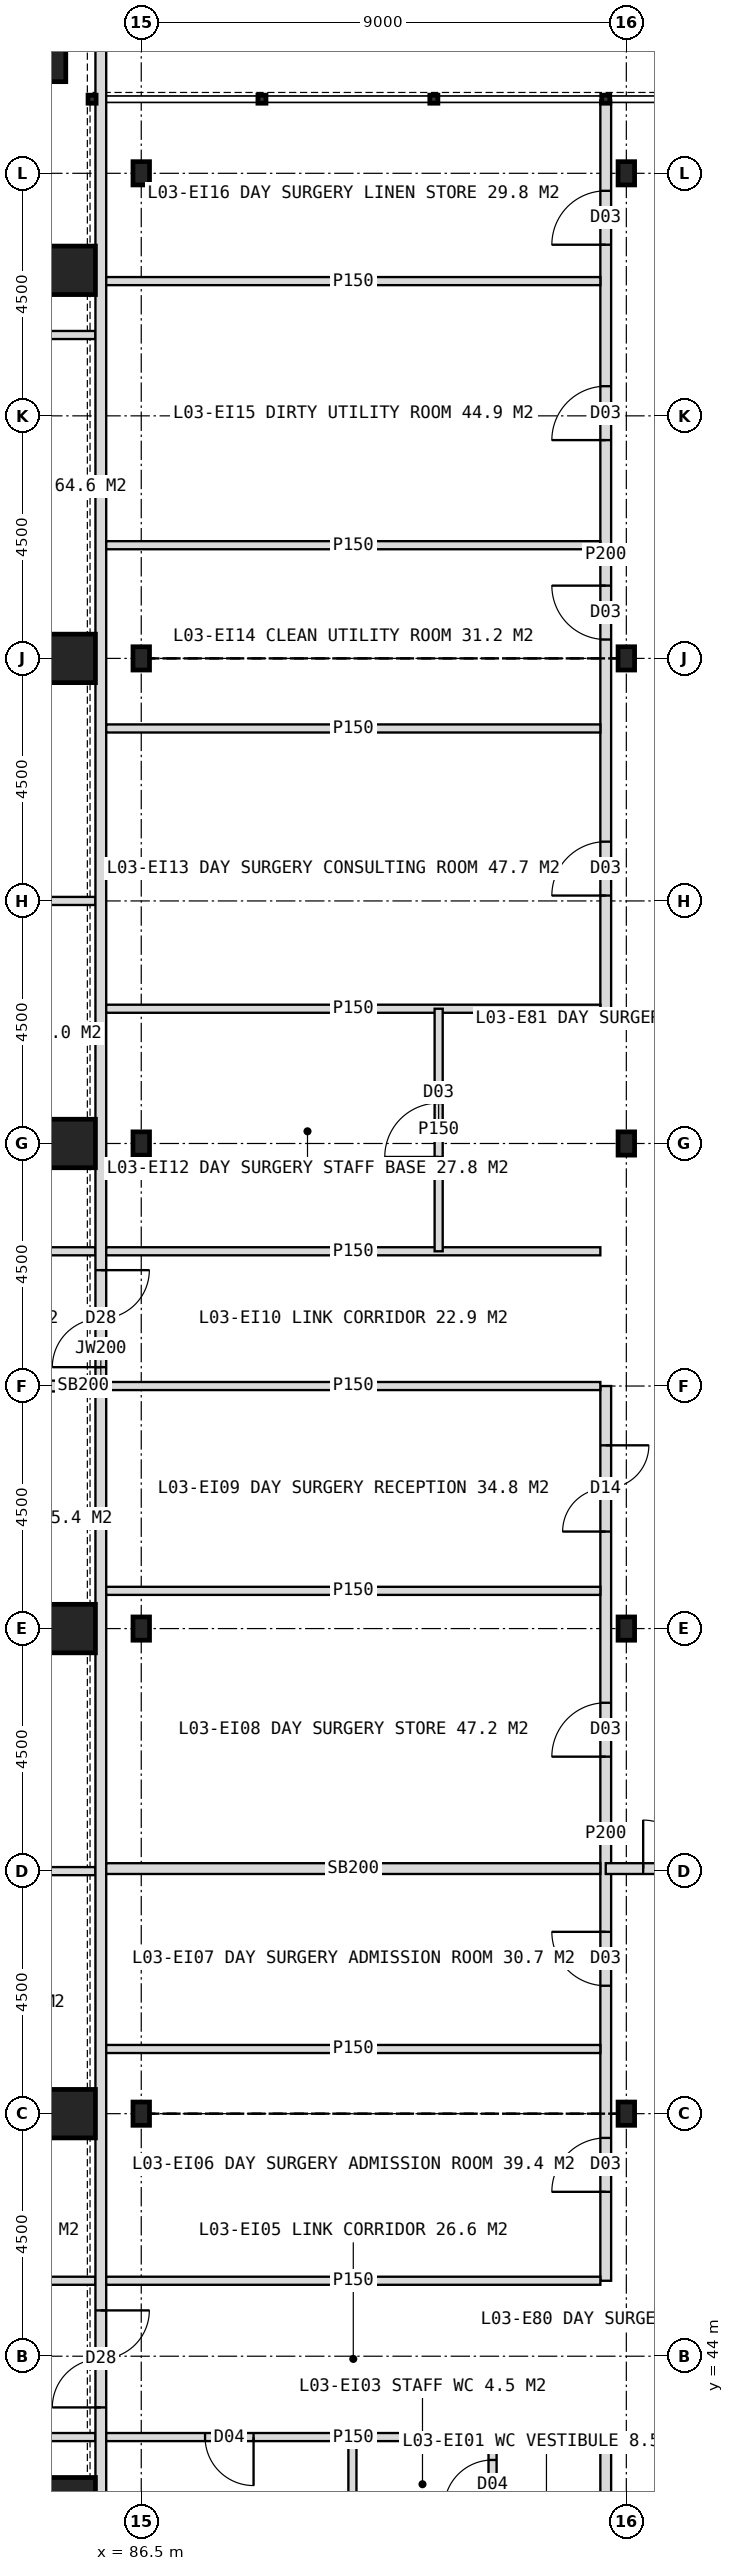
"""IFC4 building model, lengths in metres.
Left out: names, types, materials, properties, quantities, classifications, styles, units other than length and angle.
Written with IfcOpenShell. Run it as: python <this file> out.ifc"""

import sys

from ifc_helpers import new_model, si_unit, direction, frame, frame_2d, origin, origin_2d, place, context, subcontext, project, spatial, rectangle, hollow_rectangle, i_section, extrude, element, fill, save


model = new_model("IFC4")
c1 = context("Model", 3, precision=1e-05, world=origin(), true_north=direction((0.0, 1.0)))
c2 = subcontext(c1, "Body", "Model", "MODEL_VIEW")
j1 = project(units=[si_unit("LENGTHUNIT", "METRE"), si_unit("PLANEANGLEUNIT", "RADIAN")], contexts=[c1])
p1 = place(None, origin())
s1 = spatial("IfcSite", under=j1, at=p1, CompositionType="ELEMENT")
p2 = place(p1, origin())
s2 = spatial("IfcBuilding", under=s1, at=p2, CompositionType="ELEMENT")
p3 = place(p2, frame((0.0, 0.0, 16.5)))
s3 = spatial("IfcBuildingStorey", under=s2, at=p3, CompositionType="ELEMENT", Elevation=16.5)
for number, where, z_axis, x_axis in (
    (1, (85.2, 41.3, 0.0), (0.0, 0.0, 1.0), (1.0, 0.0, 0.0)),
    (2, (85.2, 48.5, 0.0), (0.0, 0.0, 1.0), (1.0, 0.0, 0.0)),
    (3, (85.2, 57.5, 0.0), (0.0, 0.0, 1.0), (1.0, 0.0, 0.0)),
    (4, (85.2, 66.5, 0.0), (0.0, 0.0, 1.0), (1.0, 0.0, 0.0)),
    (5, (85.2, 75.5, 0.0), (0.0, 0.0, 1.0), (1.0, 0.0, 0.0)),
    (6, (85.2, 82.7, 0.0), (0.0, 0.0, 1.0), (1.0, 0.0, 0.0)),
    (7, (84.65, 86.65, 0.0), (0.0, 0.0, 1.0), (1.0, 0.0, 0.0)),
):
    element("IfcColumn", number, at=place(p3, frame(where, z_axis=z_axis, x_axis=x_axis)), inside=s3, PredefinedType="COLUMN", context=c2, shape_type="SweptSolid", body=[
        extrude(hollow_rectangle(XDim=0.9, YDim=0.9, WallThickness=0.08, at=origin_2d()), origin(), (0.0, 0.0, 1.0), 4.5),
    ])
for number, where, z_axis, x_axis in (
    (8, (86.5, 48.5, 0.0), (0.0, 0.0, 1.0), (1.0, 0.0, 0.0)),
    (9, (86.5, 57.5, 0.0), (0.0, 0.0, 1.0), (1.0, 0.0, 0.0)),
    (10, (86.5, 66.5, 0.0), (0.0, 0.0, 1.0), (1.0, 0.0, 0.0)),
    (11, (86.5, 75.5, 0.0), (0.0, 0.0, 1.0), (1.0, 0.0, 0.0)),
    (12, (86.5, 84.5, 0.0), (0.0, 0.0, 1.0), (1.0, 0.0, 0.0)),
    (13, (95.5, 48.5, 0.0), (0.0, 0.0, 1.0), (1.0, 0.0, 0.0)),
    (14, (95.5, 57.5, 0.0), (0.0, 0.0, 1.0), (1.0, 0.0, 0.0)),
    (15, (95.5, 66.5, 0.0), (0.0, 0.0, 1.0), (1.0, 0.0, 0.0)),
    (16, (95.5, 75.5, 0.0), (0.0, 0.0, 1.0), (1.0, 0.0, 0.0)),
    (17, (95.5, 84.5, 0.0), (0.0, 0.0, 1.0), (1.0, 0.0, 0.0)),
):
    element("IfcColumn", number, at=place(p3, frame(where, z_axis=z_axis, x_axis=x_axis)), inside=s3, PredefinedType="COLUMN", context=c2, shape_type="SweptSolid", body=[
        extrude(i_section(OverallWidth=0.307, OverallDepth=0.432, WebThickness=0.021, FlangeThickness=0.04, FilletRadius=0.027, at=origin_2d()), origin(), (0.0, 0.0, 1.0), 4.5),
    ])
for number, where, z_axis, x_axis in (
    (18, (79.5, 81.5, 0.0), (0.0, 0.0, 1.0), (1.0, 0.0, 0.0)),
    (19, (79.5, 71.0, 0.0), (0.0, 0.0, 1.0), (1.0, 0.0, 0.0)),
    (20, (79.5, 64.5, 0.0), (0.0, 0.0, 1.0), (1.0, 0.0, 0.0)),
):
    element("IfcWall", number, at=place(p3, frame(where, z_axis=z_axis, x_axis=x_axis)), inside=s3, PredefinedType="PARTITIONING", context=c2, shape_type="SweptSolid", body=[
        extrude(rectangle(XDim=6.15, YDim=0.15, at=frame_2d((3.075, 0.0))), origin(), (0.0, 0.0, 1.0), 4.2),
    ])
p4 = place(p3, frame((79.5, 62.0, 0.0), z_axis=(0.0, 0.0, 1.0), x_axis=(1.0, 0.0, 0.0)))
e21 = element("IfcWall", 21, at=p4, inside=s3, PredefinedType="SOLIDWALL", context=c2, shape_type="SweptSolid", body=[
    extrude(rectangle(XDim=5.7, YDim=0.2, at=frame_2d((2.85, 0.0))), origin(), (0.0, 0.0, 1.0), 3.4),
])
p5 = place(p3, frame((85.2, 62.0, 0.0), z_axis=(0.0, 0.0, 1.0), x_axis=(1.0, 0.0, 0.0)))
e22 = element("IfcWall", 22, at=p5, inside=s3, PredefinedType="SOLIDWALL", context=c2, shape_type="SweptSolid", body=[
    extrude(rectangle(XDim=0.45, YDim=0.2, at=frame_2d((0.225, 0.0))), origin(), (0.0, 0.0, 1.0), 4.2),
])
for number, where, z_axis, x_axis in (
    (23, (79.5, 53.0, 0.0), (0.0, 0.0, 1.0), (1.0, 0.0, 0.0)),
    (24, (79.5, 45.4, 0.0), (0.0, 0.0, 1.0), (1.0, 0.0, 0.0)),
    (25, (79.5, 42.5, 0.0), (0.0, 0.0, 1.0), (1.0, 0.0, 0.0)),
):
    element("IfcWall", number, at=place(p3, frame(where, z_axis=z_axis, x_axis=x_axis)), inside=s3, PredefinedType="PARTITIONING", context=c2, shape_type="SweptSolid", body=[
        extrude(rectangle(XDim=6.15, YDim=0.15, at=frame_2d((3.075, 0.0))), origin(), (0.0, 0.0, 1.0), 4.2),
    ])
p6 = place(p3, frame((95.118, 38.15, 0.0), z_axis=(0.0, 0.0, 1.0), x_axis=(0.0, 1.0, 0.0)))
e26 = element("IfcWall", 26, at=p6, inside=s3, PredefinedType="PARTITIONING", context=c2, shape_type="SweptSolid", body=[
    extrude(rectangle(XDim=4.35, YDim=0.2, at=frame_2d((2.175, 0.0))), origin(), (0.0, 0.0, 1.0), 4.2),
])
p7 = place(p6, frame((1.675, 0.0, 0.0)))
e27 = element("IfcOpeningElement", 27, at=p7, cuts=e26, PredefinedType="OPENING", context=c2, shape_type="SweptSolid", body=[
    extrude(rectangle(XDim=1.0, YDim=2.1, at=frame_2d((0.5, 1.05))), frame((0.0, 0.11, 0.0), z_axis=(0.0, -1.0, 0.0), x_axis=(1.0, 0.0, 0.0)), (0.0, 0.0, 1.0), 0.22),
])
p8 = place(p3, frame((95.118, 45.4, 0.0), z_axis=(0.0, 0.0, 1.0), x_axis=(0.0, 1.0, 0.0)))
e28 = element("IfcWall", 28, at=p8, inside=s3, PredefinedType="PARTITIONING", context=c2, shape_type="SweptSolid", body=[
    extrude(rectangle(XDim=16.6, YDim=0.2, at=frame_2d((8.3, 0.0))), origin(), (0.0, 0.0, 1.0), 4.2),
])
p9 = place(p8, frame((1.65, 0.0, 0.0)))
e29 = element("IfcOpeningElement", 29, at=p9, cuts=e28, PredefinedType="OPENING", context=c2, shape_type="SweptSolid", body=[
    extrude(rectangle(XDim=1.0, YDim=2.1, at=frame_2d((0.5, 1.05))), frame((0.0, 0.11, 0.0), z_axis=(0.0, -1.0, 0.0), x_axis=(1.0, 0.0, 0.0)), (0.0, 0.0, 1.0), 0.22),
])
p10 = place(p8, frame((5.473, 0.0, 0.0)))
e30 = element("IfcOpeningElement", 30, at=p10, cuts=e28, PredefinedType="OPENING", context=c2, shape_type="SweptSolid", body=[
    extrude(rectangle(XDim=1.0, YDim=2.1, at=frame_2d((0.5, 1.05))), frame((0.0, 0.11, 0.0), z_axis=(0.0, -1.0, 0.0), x_axis=(1.0, 0.0, 0.0)), (0.0, 0.0, 1.0), 0.22),
])
p11 = place(p8, frame((9.723, 0.0, 0.0)))
e31 = element("IfcOpeningElement", 31, at=p11, cuts=e28, PredefinedType="OPENING", context=c2, shape_type="SweptSolid", body=[
    extrude(rectangle(XDim=1.0, YDim=2.1, at=frame_2d((0.5, 1.05))), frame((0.0, 0.11, 0.0), z_axis=(0.0, -1.0, 0.0), x_axis=(1.0, 0.0, 0.0)), (0.0, 0.0, 1.0), 0.22),
])
p12 = place(p8, frame((13.9, 0.0, 0.0)))
e32 = element("IfcOpeningElement", 32, at=p12, cuts=e28, PredefinedType="OPENING", context=c2, shape_type="SweptSolid", body=[
    extrude(rectangle(XDim=1.6, YDim=2.2, at=frame_2d((0.8, 1.1))), frame((0.0, 0.11, 0.0), z_axis=(0.0, -1.0, 0.0), x_axis=(1.0, 0.0, 0.0)), (0.0, 0.0, 1.0), 0.22),
])
p13 = place(p3, frame((95.118, 69.0, 0.0), z_axis=(0.0, 0.0, 1.0), x_axis=(0.0, 1.0, 0.0)))
e33 = element("IfcWall", 33, at=p13, inside=s3, PredefinedType="PARTITIONING", context=c2, shape_type="SweptSolid", body=[
    extrude(rectangle(XDim=16.85, YDim=0.2, at=frame_2d((8.425, 0.0))), origin(), (0.0, 0.0, 1.0), 4.2),
])
p14 = place(p13, frame((2.1, 0.0, 0.0)))
e34 = element("IfcOpeningElement", 34, at=p14, cuts=e33, PredefinedType="OPENING", context=c2, shape_type="SweptSolid", body=[
    extrude(rectangle(XDim=1.0, YDim=2.1, at=frame_2d((0.5, 1.05))), frame((0.0, 0.11, 0.0), z_axis=(0.0, -1.0, 0.0), x_axis=(1.0, 0.0, 0.0)), (0.0, 0.0, 1.0), 0.22),
])
p15 = place(p13, frame((6.85, 0.0, 0.0)))
e35 = element("IfcOpeningElement", 35, at=p15, cuts=e33, PredefinedType="OPENING", context=c2, shape_type="SweptSolid", body=[
    extrude(rectangle(XDim=1.0, YDim=2.1, at=frame_2d((0.5, 1.05))), frame((0.0, 0.11, 0.0), z_axis=(0.0, -1.0, 0.0), x_axis=(1.0, 0.0, 0.0)), (0.0, 0.0, 1.0), 0.22),
])
p16 = place(p13, frame((10.55, 0.0, 0.0)))
e36 = element("IfcOpeningElement", 36, at=p16, cuts=e33, PredefinedType="OPENING", context=c2, shape_type="SweptSolid", body=[
    extrude(rectangle(XDim=1.0, YDim=2.1, at=frame_2d((0.5, 1.05))), frame((0.0, 0.11, 0.0), z_axis=(0.0, -1.0, 0.0), x_axis=(1.0, 0.0, 0.0)), (0.0, 0.0, 1.0), 0.22),
])
p17 = place(p13, frame((14.175, 0.0, 0.0)))
e37 = element("IfcOpeningElement", 37, at=p17, cuts=e33, PredefinedType="OPENING", context=c2, shape_type="SweptSolid", body=[
    extrude(rectangle(XDim=1.0, YDim=2.1, at=frame_2d((0.5, 1.05))), frame((0.0, 0.11, 0.0), z_axis=(0.0, -1.0, 0.0), x_axis=(1.0, 0.0, 0.0)), (0.0, 0.0, 1.0), 0.22),
])
p18 = place(p3, frame((98.307, 53.047, 0.0), z_axis=(0.0, 0.0, 1.0), x_axis=(-1.0, 0.0, 0.0)))
e38 = element("IfcWall", 38, at=p18, inside=s3, PredefinedType="SOLIDWALL", context=c2, shape_type="SweptSolid", body=[
    extrude(rectangle(XDim=3.189, YDim=0.2, at=frame_2d((1.594, 0.0))), origin(), (0.0, 0.0, 1.0), 4.2),
])
p19 = place(p18, frame((0.695, 0.0, 0.0)))
e39 = element("IfcOpeningElement", 39, at=p19, cuts=e38, PredefinedType="OPENING", context=c2, shape_type="SweptSolid", body=[
    extrude(rectangle(XDim=1.8, YDim=2.2, at=frame_2d((0.9, 1.1))), frame((0.0, 0.11, 0.0), z_axis=(0.0, -1.0, 0.0), x_axis=(1.0, 0.0, 0.0)), (0.0, 0.0, 1.0), 0.22),
])
p20 = place(p3, frame((85.75, 36.8, 0.0), z_axis=(0.0, 0.0, 1.0), x_axis=(0.0, 1.0, 0.0)))
e40 = element("IfcWall", 40, at=p20, inside=s3, PredefinedType="SOLIDWALL", context=c2, shape_type="SweptSolid", body=[
    extrude(rectangle(XDim=50.4, YDim=0.2, at=frame_2d((25.2, 0.0))), origin(), (0.0, 0.0, 1.0), 4.2),
])
p21 = place(p20, frame((6.25, 0.0, 0.0)))
e41 = element("IfcOpeningElement", 41, at=p21, cuts=e40, PredefinedType="OPENING", context=c2, shape_type="SweptSolid", body=[
    extrude(rectangle(XDim=1.8, YDim=2.2, at=frame_2d((0.9, 1.1))), frame((0.0, 0.11, 0.0), z_axis=(0.0, -1.0, 0.0), x_axis=(1.0, 0.0, 0.0)), (0.0, 0.0, 1.0), 0.22),
])
p22 = place(p20, frame((25.55, 0.0, 0.0)))
e42 = element("IfcOpeningElement", 42, at=p22, cuts=e40, PredefinedType="OPENING", context=c2, shape_type="SweptSolid", body=[
    extrude(rectangle(XDim=1.8, YDim=2.2, at=frame_2d((0.9, 1.1))), frame((0.0, 0.11, 0.0), z_axis=(0.0, -1.0, 0.0), x_axis=(1.0, 0.0, 0.0)), (0.0, 0.0, 1.0), 0.22),
])
p23 = place(p3, frame((95.018, 42.5, 0.0), z_axis=(0.0, 0.0, 1.0), x_axis=(-1.0, 0.0, 0.0)))
e43 = element("IfcWall", 43, at=p23, inside=s3, PredefinedType="PARTITIONING", context=c2, shape_type="SweptSolid", body=[
    extrude(rectangle(XDim=9.168, YDim=0.15, at=frame_2d((4.584, 0.0))), origin(), (0.0, 0.0, 1.0), 4.2),
])
p24 = place(p23, frame((6.434, 0.0, 0.0)))
e44 = element("IfcOpeningElement", 44, at=p24, cuts=e43, PredefinedType="OPENING", context=c2, shape_type="SweptSolid", body=[
    extrude(rectangle(XDim=0.9, YDim=2.1, at=frame_2d((0.45, 1.05))), frame((0.0, 0.085, 0.0), z_axis=(0.0, -1.0, 0.0), x_axis=(1.0, 0.0, 0.0)), (0.0, 0.0, 1.0), 0.17),
])
for number, where, z_axis, x_axis in (
    (45, (95.018, 45.4, 0.0), (0.0, 0.0, 1.0), (-1.0, 0.0, 0.0)),
    (46, (95.018, 49.7, 0.0), (0.0, 0.0, 1.0), (-1.0, 0.0, 0.0)),
):
    element("IfcWall", number, at=place(p3, frame(where, z_axis=z_axis, x_axis=x_axis)), inside=s3, PredefinedType="PARTITIONING", context=c2, shape_type="SweptSolid", body=[
        extrude(rectangle(XDim=9.168, YDim=0.15, at=frame_2d((4.584, 0.0))), origin(), (0.0, 0.0, 1.0), 4.2),
    ])
p25 = place(p3, frame((95.018, 53.047, 0.0), z_axis=(0.0, 0.0, 1.0), x_axis=(-1.0, 0.0, 0.0)))
e47 = element("IfcWall", 47, at=p25, inside=s3, PredefinedType="SOLIDWALL", context=c2, shape_type="SweptSolid", body=[
    extrude(rectangle(XDim=9.168, YDim=0.2, at=frame_2d((4.584, 0.0))), origin(), (0.0, 0.0, 1.0), 4.2),
])
for number, where, z_axis, x_axis in (
    (48, (95.018, 58.2, 0.0), (0.0, 0.0, 1.0), (-1.0, 0.0, 0.0)),
    (49, (95.018, 62.0, 0.0), (0.0, 0.0, 1.0), (-1.0, 0.0, 0.0)),
    (50, (95.018, 64.5, 0.0), (0.0, 0.0, 1.0), (-1.0, 0.0, 0.0)),
    (51, (95.018, 69.0, 0.0), (0.0, 0.0, 1.0), (-1.0, 0.0, 0.0)),
    (52, (95.018, 74.2, 0.0), (0.0, 0.0, 1.0), (-1.0, 0.0, 0.0)),
    (53, (95.018, 77.6, 0.0), (0.0, 0.0, 1.0), (-1.0, 0.0, 0.0)),
    (54, (95.018, 82.5, 0.0), (0.0, 0.0, 1.0), (-1.0, 0.0, 0.0)),
):
    element("IfcWall", number, at=place(p3, frame(where, z_axis=z_axis, x_axis=x_axis)), inside=s3, PredefinedType="PARTITIONING", context=c2, shape_type="SweptSolid", body=[
        extrude(rectangle(XDim=9.168, YDim=0.15, at=frame_2d((4.584, 0.0))), origin(), (0.0, 0.0, 1.0), 4.2),
    ])
p26 = place(p3, frame((93.018, 38.15, 0.0), z_axis=(0.0, 0.0, 1.0), x_axis=(0.0, 1.0, 0.0)))
e55 = element("IfcWall", 55, at=p26, inside=s3, PredefinedType="PARTITIONING", context=c2, shape_type="SweptSolid", body=[
    extrude(rectangle(XDim=4.35, YDim=0.15, at=frame_2d((2.175, 0.0))), origin(), (0.0, 0.0, 1.0), 4.2),
])
p27 = place(p26, frame((0.85, 0.0, 0.0)))
e56 = element("IfcOpeningElement", 56, at=p27, cuts=e55, PredefinedType="OPENING", context=c2, shape_type="SweptSolid", body=[
    extrude(rectangle(XDim=1.0, YDim=2.1, at=frame_2d((0.5, 1.05))), frame((0.0, 0.085, 0.0), z_axis=(0.0, -1.0, 0.0), x_axis=(1.0, 0.0, 0.0)), (0.0, 0.0, 1.0), 0.17),
])
p28 = place(p26, frame((3.025, 0.0, 0.0)))
e57 = element("IfcOpeningElement", 57, at=p28, cuts=e55, PredefinedType="OPENING", context=c2, shape_type="SweptSolid", body=[
    extrude(rectangle(XDim=0.9, YDim=2.1, at=frame_2d((0.45, 1.05))), frame((0.0, 0.085, 0.0), z_axis=(0.0, -1.0, 0.0), x_axis=(1.0, 0.0, 0.0)), (0.0, 0.0, 1.0), 0.17),
])
p29 = place(p3, frame((92.018, 64.5, 0.0), z_axis=(0.0, 0.0, 1.0), x_axis=(0.0, 1.0, 0.0)))
e58 = element("IfcWall", 58, at=p29, inside=s3, PredefinedType="PARTITIONING", context=c2, shape_type="SweptSolid", body=[
    extrude(rectangle(XDim=4.5, YDim=0.15, at=frame_2d((2.25, 0.0))), origin(), (0.0, 0.0, 1.0), 4.2),
])
p30 = place(p29, frame((1.75, 0.0, 0.0)))
e59 = element("IfcOpeningElement", 59, at=p30, cuts=e58, PredefinedType="OPENING", context=c2, shape_type="SweptSolid", body=[
    extrude(rectangle(XDim=1.0, YDim=2.1, at=frame_2d((0.5, 1.05))), frame((0.0, 0.085, 0.0), z_axis=(0.0, -1.0, 0.0), x_axis=(1.0, 0.0, 0.0)), (0.0, 0.0, 1.0), 0.17),
])
p31 = place(p3, frame((90.418, 38.15, 0.0), z_axis=(0.0, 0.0, 1.0), x_axis=(0.0, 1.0, 0.0)))
e60 = element("IfcWall", 60, at=p31, inside=s3, PredefinedType="PARTITIONING", context=c2, shape_type="SweptSolid", body=[
    extrude(rectangle(XDim=4.35, YDim=0.15, at=frame_2d((2.175, 0.0))), origin(), (0.0, 0.0, 1.0), 4.2),
])
p32 = place(p19, origin())
e61 = element("IfcDoor", 61, at=p32, inside=s3, OperationType="DOUBLE_DOOR_DOUBLE_SWING", PredefinedType="DOOR", context=c2, shape_type="SweptSolid", body=[
    extrude(rectangle(XDim=1.8, YDim=2.2, at=frame_2d((0.9, 1.1))), frame((0.0, 0.025, 0.0), z_axis=(0.0, -1.0, 0.0), x_axis=(1.0, 0.0, 0.0)), (0.0, 0.0, 1.0), 0.05),
])
fill(e39, e61)
p33 = place(p21, origin())
e62 = element("IfcDoor", 62, at=p33, inside=s3, OperationType="DOUBLE_DOOR_SINGLE_SWING", PredefinedType="DOOR", context=c2, shape_type="SweptSolid", body=[
    extrude(rectangle(XDim=1.8, YDim=2.2, at=frame_2d((0.9, 1.1))), frame((0.0, 0.025, 0.0), z_axis=(0.0, -1.0, 0.0), x_axis=(1.0, 0.0, 0.0)), (0.0, 0.0, 1.0), 0.05),
])
fill(e41, e62)
p34 = place(p22, origin())
e63 = element("IfcDoor", 63, at=p34, inside=s3, OperationType="DOUBLE_DOOR_SINGLE_SWING", PredefinedType="DOOR", context=c2, shape_type="SweptSolid", body=[
    extrude(rectangle(XDim=1.8, YDim=2.2, at=frame_2d((0.9, 1.1))), frame((0.0, 0.025, 0.0), z_axis=(0.0, -1.0, 0.0), x_axis=(1.0, 0.0, 0.0)), (0.0, 0.0, 1.0), 0.05),
])
fill(e42, e63)
p35 = place(p28, origin())
e64 = element("IfcDoor", 64, at=p35, inside=s3, OperationType="SINGLE_SWING_LEFT", PredefinedType="DOOR", context=c2, shape_type="SweptSolid", body=[
    extrude(rectangle(XDim=0.9, YDim=2.1, at=frame_2d((0.45, 1.05))), frame((0.0, 0.025, 0.0), z_axis=(0.0, -1.0, 0.0), x_axis=(1.0, 0.0, 0.0)), (0.0, 0.0, 1.0), 0.05),
])
fill(e57, e64)
p36 = place(p24, origin())
e65 = element("IfcDoor", 65, at=p36, inside=s3, OperationType="SINGLE_SWING_LEFT", PredefinedType="DOOR", context=c2, shape_type="SweptSolid", body=[
    extrude(rectangle(XDim=0.9, YDim=2.1, at=frame_2d((0.45, 1.05))), frame((0.0, 0.025, 0.0), z_axis=(0.0, -1.0, 0.0), x_axis=(1.0, 0.0, 0.0)), (0.0, 0.0, 1.0), 0.05),
])
fill(e44, e65)
p37 = place(p9, origin())
e66 = element("IfcDoor", 66, at=p37, inside=s3, OperationType="SINGLE_SWING_LEFT", PredefinedType="DOOR", context=c2, shape_type="SweptSolid", body=[
    extrude(rectangle(XDim=1.0, YDim=2.1, at=frame_2d((0.5, 1.05))), frame((0.0, 0.025, 0.0), z_axis=(0.0, -1.0, 0.0), x_axis=(1.0, 0.0, 0.0)), (0.0, 0.0, 1.0), 0.05),
])
fill(e29, e66)
p38 = place(p10, origin())
e67 = element("IfcDoor", 67, at=p38, inside=s3, OperationType="SINGLE_SWING_RIGHT", PredefinedType="DOOR", context=c2, shape_type="SweptSolid", body=[
    extrude(rectangle(XDim=1.0, YDim=2.1, at=frame_2d((0.5, 1.05))), frame((0.0, 0.025, 0.0), z_axis=(0.0, -1.0, 0.0), x_axis=(1.0, 0.0, 0.0)), (0.0, 0.0, 1.0), 0.05),
])
fill(e30, e67)
p39 = place(p11, origin())
e68 = element("IfcDoor", 68, at=p39, inside=s3, OperationType="SINGLE_SWING_LEFT", PredefinedType="DOOR", context=c2, shape_type="SweptSolid", body=[
    extrude(rectangle(XDim=1.0, YDim=2.1, at=frame_2d((0.5, 1.05))), frame((0.0, 0.025, 0.0), z_axis=(0.0, -1.0, 0.0), x_axis=(1.0, 0.0, 0.0)), (0.0, 0.0, 1.0), 0.05),
])
fill(e31, e68)
p40 = place(p12, origin())
e69 = element("IfcDoor", 69, at=p40, inside=s3, OperationType="DOUBLE_DOOR_DOUBLE_SWING", PredefinedType="DOOR", context=c2, shape_type="SweptSolid", body=[
    extrude(rectangle(XDim=1.6, YDim=2.2, at=frame_2d((0.8, 1.1))), frame((0.0, 0.025, 0.0), z_axis=(0.0, -1.0, 0.0), x_axis=(1.0, 0.0, 0.0)), (0.0, 0.0, 1.0), 0.05),
])
fill(e32, e69)
p41 = place(p30, origin())
e70 = element("IfcDoor", 70, at=p41, inside=s3, OperationType="SINGLE_SWING_LEFT", PredefinedType="DOOR", context=c2, shape_type="SweptSolid", body=[
    extrude(rectangle(XDim=1.0, YDim=2.1, at=frame_2d((0.5, 1.05))), frame((0.0, 0.025, 0.0), z_axis=(0.0, -1.0, 0.0), x_axis=(1.0, 0.0, 0.0)), (0.0, 0.0, 1.0), 0.05),
])
fill(e59, e70)
p42 = place(p14, origin())
e71 = element("IfcDoor", 71, at=p42, inside=s3, OperationType="SINGLE_SWING_LEFT", PredefinedType="DOOR", context=c2, shape_type="SweptSolid", body=[
    extrude(rectangle(XDim=1.0, YDim=2.1, at=frame_2d((0.5, 1.05))), frame((0.0, 0.025, 0.0), z_axis=(0.0, -1.0, 0.0), x_axis=(1.0, 0.0, 0.0)), (0.0, 0.0, 1.0), 0.05),
])
fill(e34, e71)
p43 = place(p15, origin())
e72 = element("IfcDoor", 72, at=p43, inside=s3, OperationType="SINGLE_SWING_RIGHT", PredefinedType="DOOR", context=c2, shape_type="SweptSolid", body=[
    extrude(rectangle(XDim=1.0, YDim=2.1, at=frame_2d((0.5, 1.05))), frame((0.0, 0.025, 0.0), z_axis=(0.0, -1.0, 0.0), x_axis=(1.0, 0.0, 0.0)), (0.0, 0.0, 1.0), 0.05),
])
fill(e35, e72)
p44 = place(p16, origin())
e73 = element("IfcDoor", 73, at=p44, inside=s3, OperationType="SINGLE_SWING_LEFT", PredefinedType="DOOR", context=c2, shape_type="SweptSolid", body=[
    extrude(rectangle(XDim=1.0, YDim=2.1, at=frame_2d((0.5, 1.05))), frame((0.0, 0.025, 0.0), z_axis=(0.0, -1.0, 0.0), x_axis=(1.0, 0.0, 0.0)), (0.0, 0.0, 1.0), 0.05),
])
fill(e36, e73)
p45 = place(p17, origin())
e74 = element("IfcDoor", 74, at=p45, inside=s3, OperationType="SINGLE_SWING_LEFT", PredefinedType="DOOR", context=c2, shape_type="SweptSolid", body=[
    extrude(rectangle(XDim=1.0, YDim=2.1, at=frame_2d((0.5, 1.05))), frame((0.0, 0.025, 0.0), z_axis=(0.0, -1.0, 0.0), x_axis=(1.0, 0.0, 0.0)), (0.0, 0.0, 1.0), 0.05),
])
fill(e37, e74)
save(model, sys.argv[1])
